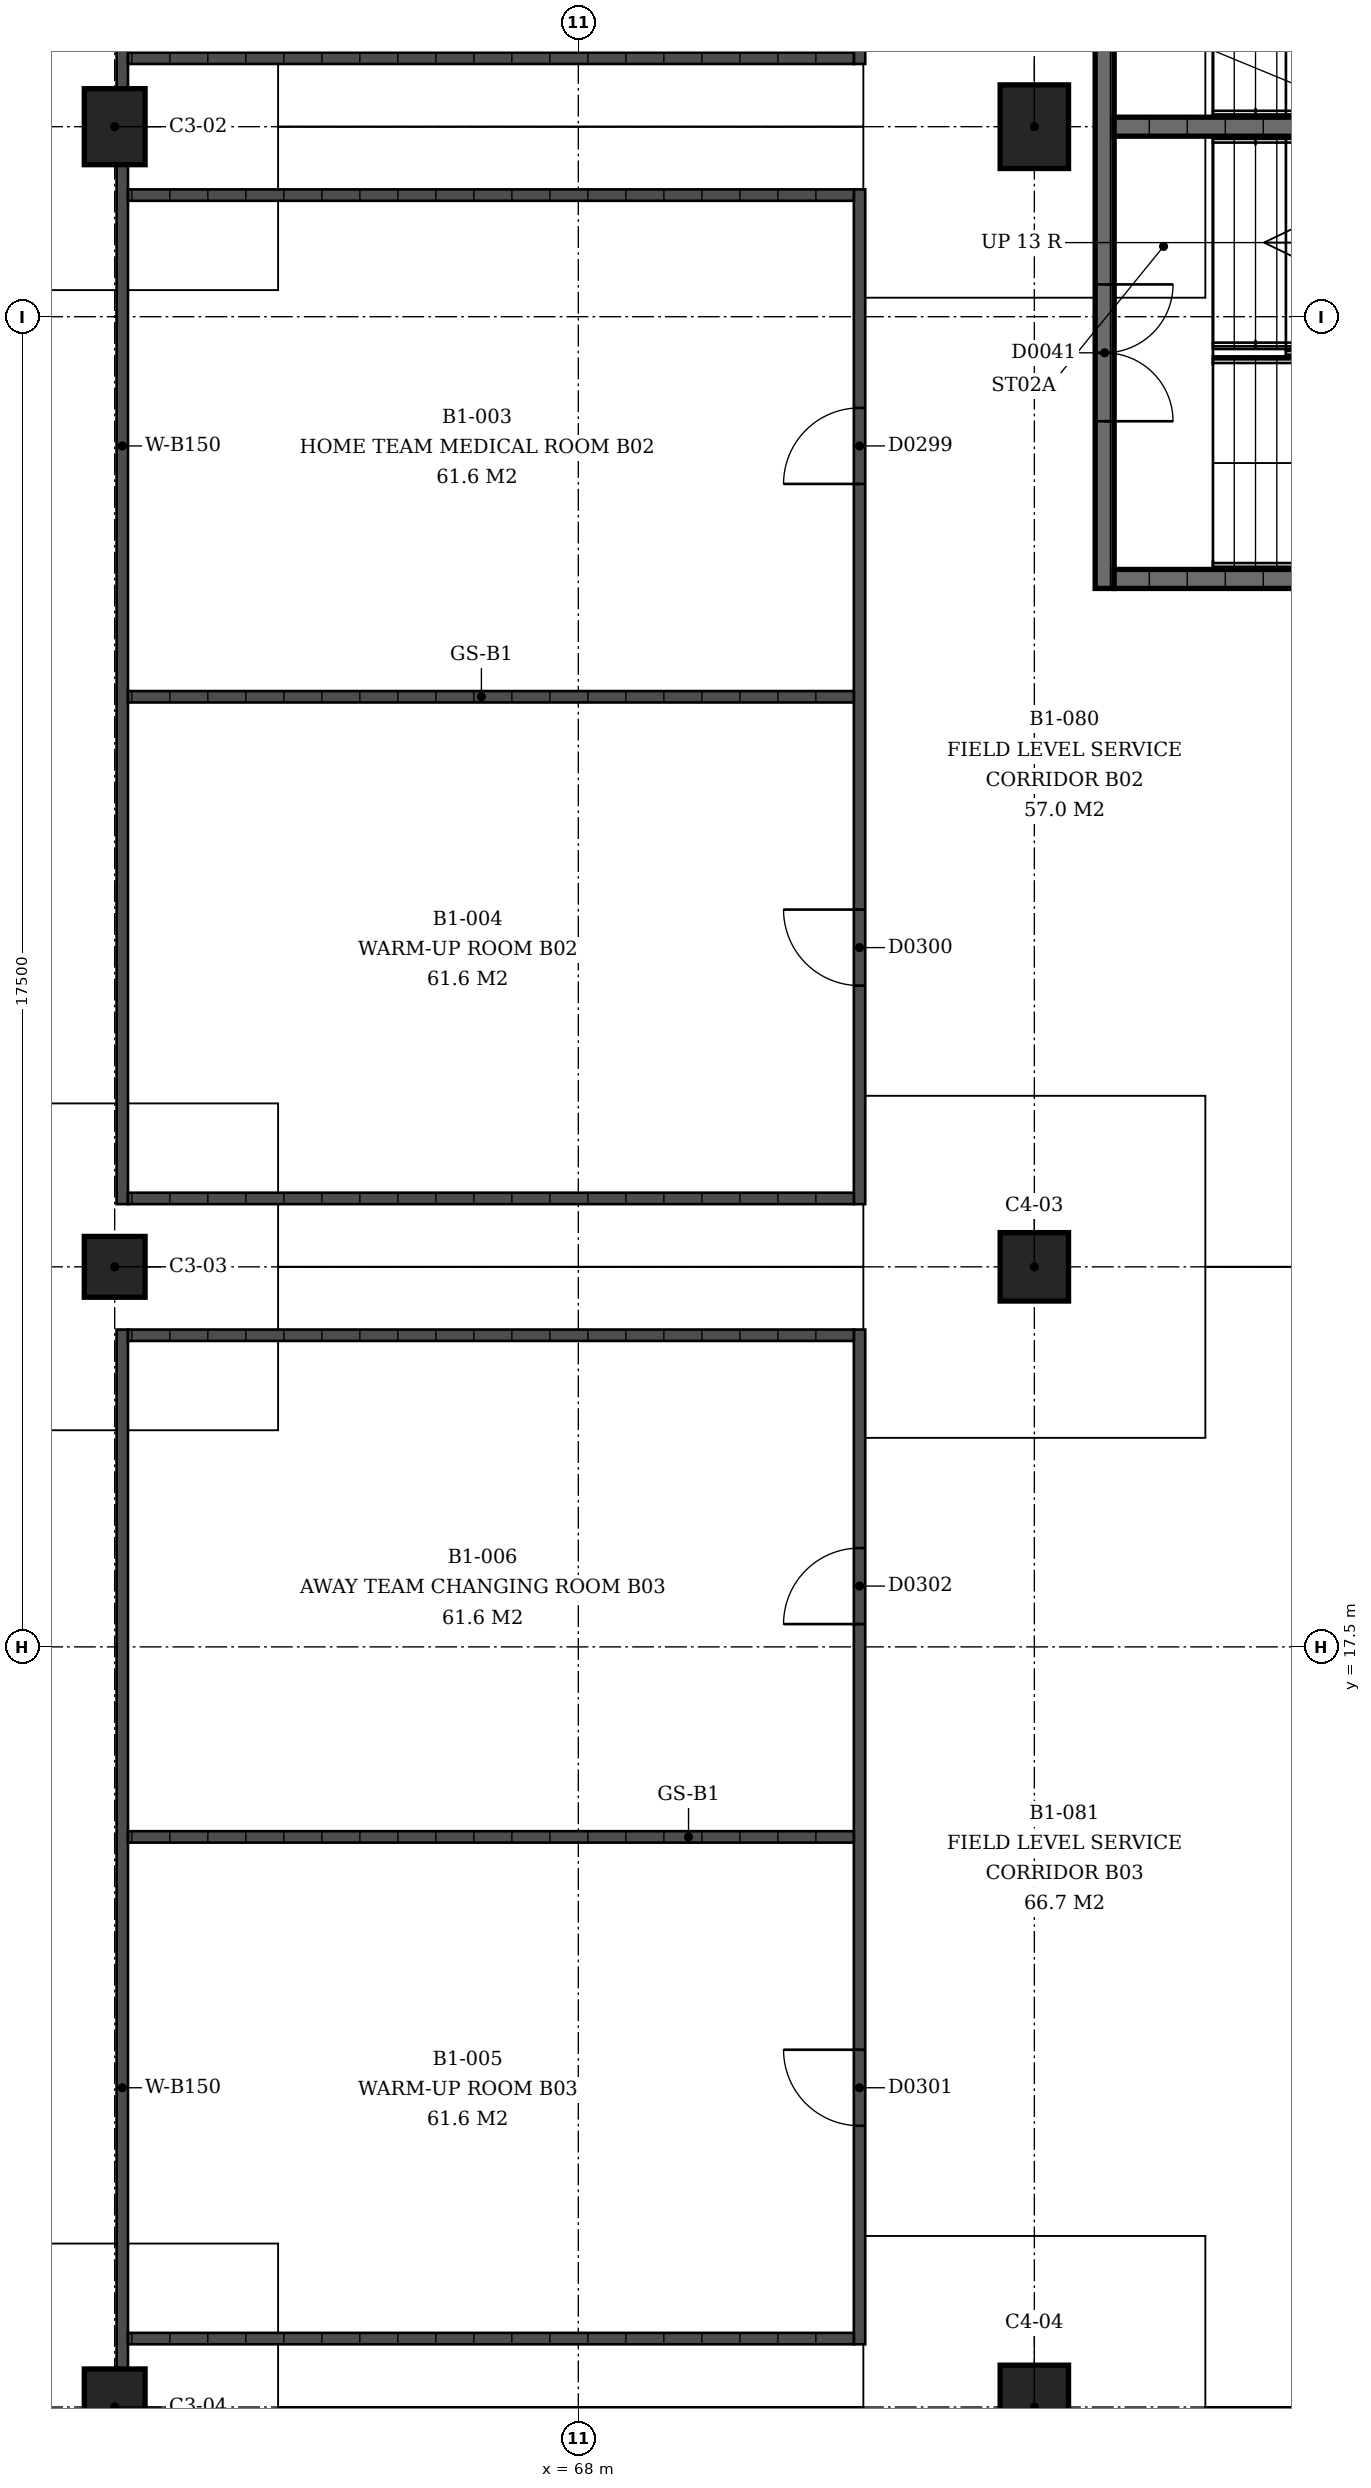
"""IFC4 building model, lengths in metres.
Left out: names, types, materials, properties, quantities, classifications, styles, units other than length and angle.
Written with IfcOpenShell. Run it as: python <this file> out.ifc"""

import sys

from ifc_helpers import new_model, si_unit, direction, frame, frame_2d, origin, origin_2d, place, context, subcontext, project, spatial, rectangle, extrude, element, fill, save


model = new_model("IFC4")
c1 = context("Model", 3, precision=1e-05, world=origin(), true_north=direction((0.0, 1.0)))
c2 = subcontext(c1, "Body", "Model", "MODEL_VIEW")
j1 = project(units=[si_unit("LENGTHUNIT", "METRE"), si_unit("PLANEANGLEUNIT", "RADIAN")], contexts=[c1])
p1 = place(None, origin())
s1 = spatial("IfcSite", under=j1, at=p1, CompositionType="ELEMENT")
p2 = place(p1, origin())
s2 = spatial("IfcBuilding", under=s1, at=p2, CompositionType="ELEMENT")
p3 = place(p2, frame((0.0, 0.0, -4.5)))
s3 = spatial("IfcBuildingStorey", under=s2, at=p3, CompositionType="ELEMENT", Elevation=-4.5)
p4 = place(p3, frame((61.9, 37.5, 0.0), z_axis=(0.0, 0.0, 1.0), x_axis=(0.0, 1.0, 0.0)))
e1 = element("IfcColumn", 1, at=p4, inside=s3, PredefinedType="COLUMN", context=c2, shape_type="SweptSolid", body=[
    extrude(rectangle(XDim=1.0, YDim=0.8, at=origin_2d()), origin(), (0.0, 0.0, 1.0), 4.5),
])
p5 = place(p3, frame((74.0, 37.5, 0.0), z_axis=(0.0, 0.0, 1.0), x_axis=(0.0, 1.0, 0.0)))
e2 = element("IfcColumn", 2, at=p5, inside=s3, PredefinedType="COLUMN", context=c2, shape_type="SweptSolid", body=[
    extrude(rectangle(XDim=1.1, YDim=0.9, at=origin_2d()), origin(), (0.0, 0.0, 1.0), 4.5),
])
p6 = place(p3, frame((61.9, 22.5, 0.0), z_axis=(0.0, 0.0, 1.0), x_axis=(0.0, 1.0, 0.0)))
e3 = element("IfcColumn", 3, at=p6, inside=s3, PredefinedType="COLUMN", context=c2, shape_type="SweptSolid", body=[
    extrude(rectangle(XDim=0.8, YDim=0.8, at=origin_2d()), origin(), (0.0, 0.0, 1.0), 4.5),
])
p7 = place(p3, frame((74.0, 22.5, 0.0), z_axis=(0.0, 0.0, 1.0), x_axis=(0.0, 1.0, 0.0)))
e4 = element("IfcColumn", 4, at=p7, inside=s3, PredefinedType="COLUMN", context=c2, shape_type="SweptSolid", body=[
    extrude(rectangle(XDim=0.9, YDim=0.9, at=origin_2d()), origin(), (0.0, 0.0, 1.0), 4.5),
])
p8 = place(p3, frame((61.9, 7.5, 0.0), z_axis=(0.0, 0.0, 1.0), x_axis=(0.0, 1.0, 0.0)))
e5 = element("IfcColumn", 5, at=p8, inside=s3, PredefinedType="COLUMN", context=c2, shape_type="SweptSolid", body=[
    extrude(rectangle(XDim=1.0, YDim=0.8, at=origin_2d()), origin(), (0.0, 0.0, 1.0), 4.5),
])
p9 = place(p3, frame((74.0, 7.5, 0.0), z_axis=(0.0, 0.0, 1.0), x_axis=(0.0, 1.0, 0.0)))
e6 = element("IfcColumn", 6, at=p9, inside=s3, PredefinedType="COLUMN", context=c2, shape_type="SweptSolid", body=[
    extrude(rectangle(XDim=1.1, YDim=0.9, at=origin_2d()), origin(), (0.0, 0.0, 1.0), 4.5),
])
p10 = place(p3, frame((74.925, 31.425, 0.0), z_axis=(0.0, 0.0, 1.0), x_axis=(0.0, 1.0, 0.0)))
e7 = element("IfcWall", 7, at=p10, inside=s3, PredefinedType="SHEAR", context=c2, shape_type="SweptSolid", body=[
    extrude(rectangle(XDim=12.15, YDim=0.25, at=frame_2d((6.075, 0.0))), origin(), (0.0, 0.0, 1.0), 4.09),
])
p11 = place(p10, frame((2.2, 0.0, 0.0)))
e8 = element("IfcOpeningElement", 8, at=p11, cuts=e7, PredefinedType="OPENING", context=c2, shape_type="SweptSolid", body=[
    extrude(rectangle(XDim=1.8, YDim=2.1, at=frame_2d((0.9, 1.05))), frame((0.0, 0.125, 0.0), z_axis=(0.0, -1.0, 0.0), x_axis=(1.0, 0.0, 0.0)), (0.0, 0.0, 1.0), 0.25),
])
p12 = place(p10, frame((8.15, 0.0, 0.0)))
e9 = element("IfcOpeningElement", 9, at=p12, cuts=e7, PredefinedType="OPENING", context=c2, shape_type="SweptSolid", body=[
    extrude(rectangle(XDim=1.8, YDim=2.1, at=frame_2d((0.9, 1.05))), frame((0.0, 0.125, 0.0), z_axis=(0.0, -1.0, 0.0), x_axis=(1.0, 0.0, 0.0)), (0.0, 0.0, 1.0), 0.25),
])
for number, where, z_axis, x_axis in (
    (10, (75.05, 31.55, 0.0), (0.0, 0.0, 1.0), (1.0, 0.0, 0.0)),
    (11, (75.05, 37.5, 0.0), (0.0, 0.0, 1.0), (1.0, 0.0, 0.0)),
):
    element("IfcWall", number, at=place(p3, frame(where, z_axis=z_axis, x_axis=x_axis)), inside=s3, PredefinedType="SHEAR", context=c2, shape_type="SweptSolid", body=[
        extrude(rectangle(XDim=7.46, YDim=0.25, at=frame_2d((3.73, 0.0))), origin(), (0.0, 0.0, 1.0), 4.09),
    ])
p13 = place(p3, frame((62.0, 38.0, 0.0), z_axis=(0.0, 0.0, 1.0), x_axis=(0.0, 1.0, 0.0)))
e12 = element("IfcWall", 12, at=p13, inside=s3, PredefinedType="SOLIDWALL", context=c2, shape_type="SweptSolid", body=[
    extrude(rectangle(XDim=13.675, YDim=0.15, at=frame_2d((6.837, 0.0))), origin(), (0.0, 0.0, 1.0), 3.0),
])
p14 = place(p3, frame((71.7, 38.325, 0.0), z_axis=(0.0, 0.0, 1.0), x_axis=(0.0, 1.0, 0.0)))
e13 = element("IfcWall", 13, at=p14, inside=s3, PredefinedType="SOLIDWALL", context=c2, shape_type="SweptSolid", body=[
    extrude(rectangle(XDim=13.35, YDim=0.15, at=frame_2d((6.675, 0.0))), origin(), (0.0, 0.0, 1.0), 3.0),
])
p15 = place(p14, frame((2.875, 0.0, 0.0)))
e14 = element("IfcOpeningElement", 14, at=p15, cuts=e13, PredefinedType="OPENING", context=c2, shape_type="SweptSolid", body=[
    extrude(rectangle(XDim=1.0, YDim=2.1, at=frame_2d((0.5, 1.05))), frame((0.0, 0.075, 0.0), z_axis=(0.0, -1.0, 0.0), x_axis=(1.0, 0.0, 0.0)), (0.0, 0.0, 1.0), 0.15),
])
p16 = place(p14, frame((9.475, 0.0, 0.0)))
e15 = element("IfcOpeningElement", 15, at=p16, cuts=e13, PredefinedType="OPENING", context=c2, shape_type="SweptSolid", body=[
    extrude(rectangle(XDim=1.0, YDim=2.1, at=frame_2d((0.5, 1.05))), frame((0.0, 0.075, 0.0), z_axis=(0.0, -1.0, 0.0), x_axis=(1.0, 0.0, 0.0)), (0.0, 0.0, 1.0), 0.15),
])
p17 = place(p3, frame((62.075, 38.4, 0.0), z_axis=(0.0, 0.0, 1.0), x_axis=(1.0, 0.0, 0.0)))
e16 = element("IfcWall", 16, at=p17, inside=s3, PredefinedType="SOLIDWALL", context=c2, shape_type="SweptSolid", body=[
    extrude(rectangle(XDim=9.55, YDim=0.15, at=frame_2d((4.775, 0.0))), origin(), (0.0, 0.0, 1.0), 3.0),
])
p18 = place(p3, frame((62.0, 37.0, 0.0), z_axis=(0.0, 0.0, 1.0), x_axis=(0.0, -1.0, 0.0)))
e17 = element("IfcWall", 17, at=p18, inside=s3, PredefinedType="SOLIDWALL", context=c2, shape_type="SweptSolid", body=[
    extrude(rectangle(XDim=13.675, YDim=0.15, at=frame_2d((6.837, 0.0))), origin(), (0.0, 0.0, 1.0), 3.0),
])
p19 = place(p3, frame((71.7, 36.675, 0.0), z_axis=(0.0, 0.0, 1.0), x_axis=(0.0, -1.0, 0.0)))
e18 = element("IfcWall", 18, at=p19, inside=s3, PredefinedType="SOLIDWALL", context=c2, shape_type="SweptSolid", body=[
    extrude(rectangle(XDim=13.35, YDim=0.15, at=frame_2d((6.675, 0.0))), origin(), (0.0, 0.0, 1.0), 3.0),
])
p20 = place(p19, frame((2.875, 0.0, 0.0)))
e19 = element("IfcOpeningElement", 19, at=p20, cuts=e18, PredefinedType="OPENING", context=c2, shape_type="SweptSolid", body=[
    extrude(rectangle(XDim=1.0, YDim=2.1, at=frame_2d((0.5, 1.05))), frame((0.0, 0.075, 0.0), z_axis=(0.0, -1.0, 0.0), x_axis=(1.0, 0.0, 0.0)), (0.0, 0.0, 1.0), 0.15),
])
p21 = place(p19, frame((9.475, 0.0, 0.0)))
e20 = element("IfcOpeningElement", 20, at=p21, cuts=e18, PredefinedType="OPENING", context=c2, shape_type="SweptSolid", body=[
    extrude(rectangle(XDim=1.0, YDim=2.1, at=frame_2d((0.5, 1.05))), frame((0.0, 0.075, 0.0), z_axis=(0.0, -1.0, 0.0), x_axis=(1.0, 0.0, 0.0)), (0.0, 0.0, 1.0), 0.15),
])
for number, where, z_axis, x_axis in (
    (21, (62.075, 36.6, 0.0), (0.0, 0.0, 1.0), (1.0, 0.0, 0.0)),
    (22, (62.075, 30.0, 0.0), (0.0, 0.0, 1.0), (1.0, 0.0, 0.0)),
    (23, (62.075, 23.4, 0.0), (0.0, 0.0, 1.0), (1.0, 0.0, 0.0)),
):
    element("IfcWall", number, at=place(p3, frame(where, z_axis=z_axis, x_axis=x_axis)), inside=s3, PredefinedType="SOLIDWALL", context=c2, shape_type="SweptSolid", body=[
        extrude(rectangle(XDim=9.55, YDim=0.15, at=frame_2d((4.775, 0.0))), origin(), (0.0, 0.0, 1.0), 3.0),
    ])
p22 = place(p3, frame((62.0, 8.0, 0.0), z_axis=(0.0, 0.0, 1.0), x_axis=(0.0, 1.0, 0.0)))
e24 = element("IfcWall", 24, at=p22, inside=s3, PredefinedType="SOLIDWALL", context=c2, shape_type="SweptSolid", body=[
    extrude(rectangle(XDim=13.675, YDim=0.15, at=frame_2d((6.837, 0.0))), origin(), (0.0, 0.0, 1.0), 3.0),
])
p23 = place(p3, frame((71.7, 8.325, 0.0), z_axis=(0.0, 0.0, 1.0), x_axis=(0.0, 1.0, 0.0)))
e25 = element("IfcWall", 25, at=p23, inside=s3, PredefinedType="SOLIDWALL", context=c2, shape_type="SweptSolid", body=[
    extrude(rectangle(XDim=13.35, YDim=0.15, at=frame_2d((6.675, 0.0))), origin(), (0.0, 0.0, 1.0), 3.0),
])
p24 = place(p23, frame((2.875, 0.0, 0.0)))
e26 = element("IfcOpeningElement", 26, at=p24, cuts=e25, PredefinedType="OPENING", context=c2, shape_type="SweptSolid", body=[
    extrude(rectangle(XDim=1.0, YDim=2.1, at=frame_2d((0.5, 1.05))), frame((0.0, 0.075, 0.0), z_axis=(0.0, -1.0, 0.0), x_axis=(1.0, 0.0, 0.0)), (0.0, 0.0, 1.0), 0.15),
])
p25 = place(p23, frame((9.475, 0.0, 0.0)))
e27 = element("IfcOpeningElement", 27, at=p25, cuts=e25, PredefinedType="OPENING", context=c2, shape_type="SweptSolid", body=[
    extrude(rectangle(XDim=1.0, YDim=2.1, at=frame_2d((0.5, 1.05))), frame((0.0, 0.075, 0.0), z_axis=(0.0, -1.0, 0.0), x_axis=(1.0, 0.0, 0.0)), (0.0, 0.0, 1.0), 0.15),
])
for number, where, z_axis, x_axis in (
    (28, (62.075, 8.4, 0.0), (0.0, 0.0, 1.0), (1.0, 0.0, 0.0)),
    (29, (62.075, 15.0, 0.0), (0.0, 0.0, 1.0), (1.0, 0.0, 0.0)),
    (30, (62.075, 21.6, 0.0), (0.0, 0.0, 1.0), (1.0, 0.0, 0.0)),
):
    element("IfcWall", number, at=place(p3, frame(where, z_axis=z_axis, x_axis=x_axis)), inside=s3, PredefinedType="SOLIDWALL", context=c2, shape_type="SweptSolid", body=[
        extrude(rectangle(XDim=9.55, YDim=0.15, at=frame_2d((4.775, 0.0))), origin(), (0.0, 0.0, 1.0), 3.0),
    ])
p26 = place(p11, origin())
e31 = element("IfcDoor", 31, at=p26, inside=s3, OperationType="DOUBLE_DOOR_SINGLE_SWING", PredefinedType="DOOR", context=c2, shape_type="SweptSolid", body=[
    extrude(rectangle(XDim=1.8, YDim=2.1, at=frame_2d((0.9, 1.05))), frame((0.0, 0.025, 0.0), z_axis=(0.0, -1.0, 0.0), x_axis=(1.0, 0.0, 0.0)), (0.0, 0.0, 1.0), 0.05),
])
fill(e8, e31)
p27 = place(p20, origin())
e32 = element("IfcDoor", 32, at=p27, inside=s3, OperationType="SINGLE_SWING_RIGHT", PredefinedType="DOOR", context=c2, shape_type="SweptSolid", body=[
    extrude(rectangle(XDim=1.0, YDim=2.1, at=frame_2d((0.5, 1.05))), frame((0.0, 0.025, 0.0), z_axis=(0.0, -1.0, 0.0), x_axis=(1.0, 0.0, 0.0)), (0.0, 0.0, 1.0), 0.05),
])
fill(e19, e32)
p28 = place(p21, origin())
e33 = element("IfcDoor", 33, at=p28, inside=s3, OperationType="SINGLE_SWING_LEFT", PredefinedType="DOOR", context=c2, shape_type="SweptSolid", body=[
    extrude(rectangle(XDim=1.0, YDim=2.1, at=frame_2d((0.5, 1.05))), frame((0.0, 0.025, 0.0), z_axis=(0.0, -1.0, 0.0), x_axis=(1.0, 0.0, 0.0)), (0.0, 0.0, 1.0), 0.05),
])
fill(e20, e33)
p29 = place(p24, origin())
e34 = element("IfcDoor", 34, at=p29, inside=s3, OperationType="SINGLE_SWING_LEFT", PredefinedType="DOOR", context=c2, shape_type="SweptSolid", body=[
    extrude(rectangle(XDim=1.0, YDim=2.1, at=frame_2d((0.5, 1.05))), frame((0.0, 0.025, 0.0), z_axis=(0.0, -1.0, 0.0), x_axis=(1.0, 0.0, 0.0)), (0.0, 0.0, 1.0), 0.05),
])
fill(e26, e34)
p30 = place(p25, origin())
e35 = element("IfcDoor", 35, at=p30, inside=s3, OperationType="SINGLE_SWING_RIGHT", PredefinedType="DOOR", context=c2, shape_type="SweptSolid", body=[
    extrude(rectangle(XDim=1.0, YDim=2.1, at=frame_2d((0.5, 1.05))), frame((0.0, 0.025, 0.0), z_axis=(0.0, -1.0, 0.0), x_axis=(1.0, 0.0, 0.0)), (0.0, 0.0, 1.0), 0.05),
])
fill(e27, e35)
save(model, sys.argv[1])
